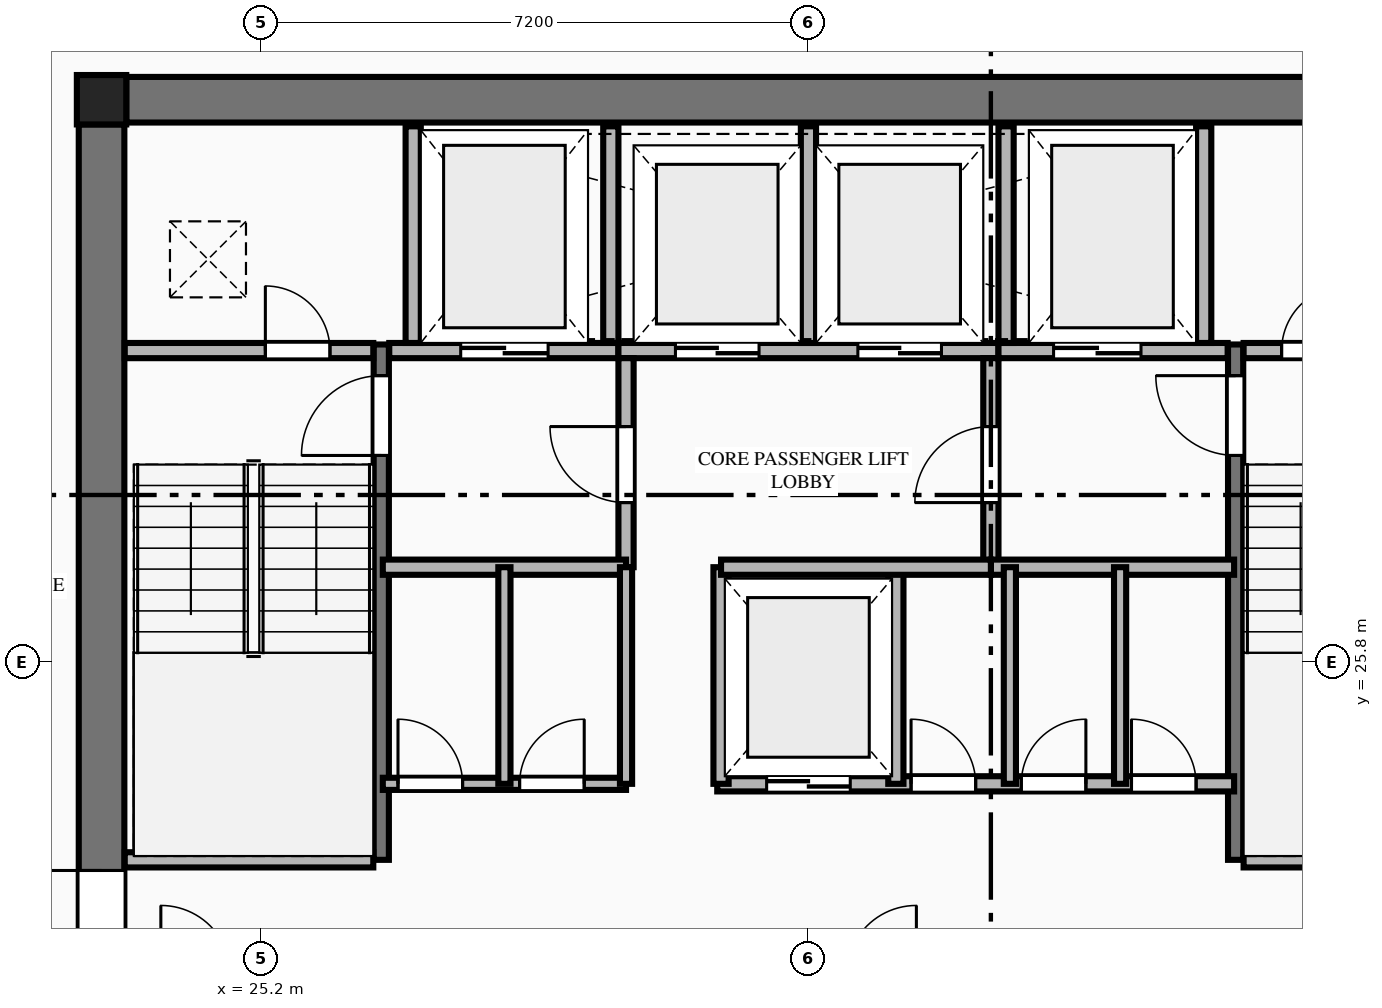
"""IFC4 building model, lengths in metres.
Left out: names, types, materials, properties, quantities, classifications, styles, units other than length and angle.
Written with IfcOpenShell. Run it as: python <this file> out.ifc"""

import sys

from ifc_helpers import new_model, si_unit, direction, frame, frame_2d, origin, origin_2d, place, context, subcontext, project, spatial, rectangle, extrude, element, fill, save


model = new_model("IFC4")
c1 = context("Model", 3, precision=1e-05, world=origin(), true_north=direction((0.0, 1.0)))
c2 = subcontext(c1, "Body", "Model", "MODEL_VIEW")
j1 = project(units=[si_unit("LENGTHUNIT", "METRE"), si_unit("PLANEANGLEUNIT", "RADIAN")], contexts=[c1])
p1 = place(None, origin())
s1 = spatial("IfcSite", under=j1, at=p1, CompositionType="ELEMENT")
p2 = place(p1, origin())
s2 = spatial("IfcBuilding", under=s1, at=p2, CompositionType="ELEMENT")
p3 = place(p2, frame((0.0, 0.0, 203.85)))
s3 = spatial("IfcBuildingStorey", under=s2, at=p3, CompositionType="ELEMENT", Elevation=203.85)
p4 = place(p3, frame((23.1, 33.2, 0.0), z_axis=(0.0, 0.0, 1.0), x_axis=(1.0, 0.0, 0.0)))
e1 = element("IfcColumn", 1, at=p4, inside=s3, PredefinedType="COLUMN", context=c2, shape_type="SweptSolid", body=[
    extrude(rectangle(XDim=0.65, YDim=0.65, at=origin_2d()), origin(), (0.0, 0.0, 1.0), 3.55),
])
p5 = place(p3, frame((23.425, 33.2, 0.0), z_axis=(0.0, 0.0, 1.0), x_axis=(1.0, 0.0, 0.0)))
e2 = element("IfcWall", 2, at=p5, inside=s3, PredefinedType="SHEAR", context=c2, shape_type="SweptSolid", body=[
    extrude(rectangle(XDim=17.95, YDim=0.6, at=frame_2d((8.975, 0.0))), origin(), (0.0, 0.0, 1.0), 3.35),
])
p6 = place(p3, frame((23.1, 18.925, 0.0), z_axis=(0.0, 0.0, 1.0), x_axis=(0.0, 1.0, 0.0)))
e3 = element("IfcWall", 3, at=p6, inside=s3, PredefinedType="SHEAR", context=c2, shape_type="SweptSolid", body=[
    extrude(rectangle(XDim=13.95, YDim=0.6, at=frame_2d((6.975, 0.0))), origin(), (0.0, 0.0, 1.0), 3.35),
])
p7 = place(p6, frame((2.915, 0.0, 0.0)))
e4 = element("IfcOpeningElement", 4, at=p7, cuts=e3, PredefinedType="OPENING", context=c2, shape_type="SweptSolid", body=[
    extrude(rectangle(XDim=1.22, YDim=2.25, at=frame_2d((0.61, 1.125))), frame((0.0, 0.31, 0.0), z_axis=(0.0, -1.0, 0.0), x_axis=(1.0, 0.0, 0.0)), (0.0, 0.0, 1.0), 0.62),
])
p8 = place(p3, frame((26.78, 23.2, 0.0), z_axis=(0.0, 0.0, 1.0), x_axis=(0.0, 1.0, 0.0)))
e5 = element("IfcWall", 5, at=p8, inside=s3, PredefinedType="SHEAR", context=c2, shape_type="SweptSolid", body=[
    extrude(rectangle(XDim=6.78, YDim=0.2, at=frame_2d((3.39, 0.0))), origin(), (0.0, 0.0, 1.0), 3.55),
])
p9 = place(p8, frame((5.32, 0.0, 0.0)))
e6 = element("IfcOpeningElement", 6, at=p9, cuts=e5, PredefinedType="OPENING", context=c2, shape_type="SweptSolid", body=[
    extrude(rectangle(XDim=1.05, YDim=2.15, at=frame_2d((0.525, 1.075))), frame((0.0, 0.11, 0.0), z_axis=(0.0, -1.0, 0.0), x_axis=(1.0, 0.0, 0.0)), (0.0, 0.0, 1.0), 0.22),
])
p10 = place(p3, frame((23.405, 23.2, 0.0), z_axis=(0.0, 0.0, 1.0), x_axis=(1.0, 0.0, 0.0)))
e7 = element("IfcWall", 7, at=p10, inside=s3, PredefinedType="PLUMBINGWALL", context=c2, shape_type="SweptSolid", body=[
    extrude(rectangle(XDim=3.27, YDim=0.2, at=frame_2d((1.635, 0.0))), origin(), (0.0, 0.0, 1.0), 3.35),
])
p11 = place(p3, frame((38.02, 23.2, 0.0), z_axis=(0.0, 0.0, 1.0), x_axis=(0.0, 1.0, 0.0)))
e8 = element("IfcWall", 8, at=p11, inside=s3, PredefinedType="SHEAR", context=c2, shape_type="SweptSolid", body=[
    extrude(rectangle(XDim=6.78, YDim=0.2, at=frame_2d((3.39, 0.0))), origin(), (0.0, 0.0, 1.0), 3.55),
])
p12 = place(p11, frame((5.32, 0.0, 0.0)))
e9 = element("IfcOpeningElement", 9, at=p12, cuts=e8, PredefinedType="OPENING", context=c2, shape_type="SweptSolid", body=[
    extrude(rectangle(XDim=1.05, YDim=2.15, at=frame_2d((0.525, 1.075))), frame((0.0, 0.11, 0.0), z_axis=(0.0, -1.0, 0.0), x_axis=(1.0, 0.0, 0.0)), (0.0, 0.0, 1.0), 0.22),
])
p13 = place(p3, frame((38.125, 23.2, 0.0), z_axis=(0.0, 0.0, 1.0), x_axis=(1.0, 0.0, 0.0)))
e10 = element("IfcWall", 10, at=p13, inside=s3, PredefinedType="PLUMBINGWALL", context=c2, shape_type="SweptSolid", body=[
    extrude(rectangle(XDim=3.27, YDim=0.2, at=frame_2d((1.635, 0.0))), origin(), (0.0, 0.0, 1.0), 3.35),
])
p14 = place(p3, frame((23.405, 29.9, 0.0), z_axis=(0.0, 0.0, 1.0), x_axis=(1.0, 0.0, 0.0)))
e11 = element("IfcWall", 11, at=p14, inside=s3, PredefinedType="PLUMBINGWALL", context=c2, shape_type="SweptSolid", body=[
    extrude(rectangle(XDim=3.27, YDim=0.2, at=frame_2d((1.635, 0.0))), origin(), (0.0, 0.0, 1.0), 3.35),
])
p15 = place(p14, frame((1.85, 0.0, 0.0)))
e12 = element("IfcOpeningElement", 12, at=p15, cuts=e11, PredefinedType="OPENING", context=c2, shape_type="SweptSolid", body=[
    extrude(rectangle(XDim=0.85, YDim=2.05, at=frame_2d((0.425, 1.025))), frame((0.0, 0.11, 0.0), z_axis=(0.0, -1.0, 0.0), x_axis=(1.0, 0.0, 0.0)), (0.0, 0.0, 1.0), 0.22),
])
p16 = place(p3, frame((26.885, 29.9, 0.0), z_axis=(0.0, 0.0, 1.0), x_axis=(1.0, 0.0, 0.0)))
e13 = element("IfcWall", 13, at=p16, inside=s3, PredefinedType="PLUMBINGWALL", context=c2, shape_type="SweptSolid", body=[
    extrude(rectangle(XDim=3.015, YDim=0.2, at=frame_2d((1.507, 0.0))), origin(), (0.0, 0.0, 1.0), 3.35),
])
p17 = place(p16, frame((0.94, 0.0, 0.0)))
e14 = element("IfcOpeningElement", 14, at=p17, cuts=e13, PredefinedType="OPENING", context=c2, shape_type="SweptSolid", body=[
    extrude(rectangle(XDim=1.15, YDim=2.2, at=frame_2d((0.575, 1.1))), frame((0.0, 0.11, 0.0), z_axis=(0.0, -1.0, 0.0), x_axis=(1.0, 0.0, 0.0)), (0.0, 0.0, 1.0), 0.22),
])
p18 = place(p3, frame((29.9, 29.9, 0.0), z_axis=(0.0, 0.0, 1.0), x_axis=(1.0, 0.0, 0.0)))
e15 = element("IfcWall", 15, at=p18, inside=s3, PredefinedType="PLUMBINGWALL", context=c2, shape_type="SweptSolid", body=[
    extrude(rectangle(XDim=5.0, YDim=0.2, at=frame_2d((2.5, 0.0))), origin(), (0.0, 0.0, 1.0), 3.35),
])
p19 = place(p18, frame((0.75, 0.0, 0.0)))
e16 = element("IfcOpeningElement", 16, at=p19, cuts=e15, PredefinedType="OPENING", context=c2, shape_type="SweptSolid", body=[
    extrude(rectangle(XDim=1.1, YDim=2.2, at=frame_2d((0.55, 1.1))), frame((0.0, 0.11, 0.0), z_axis=(0.0, -1.0, 0.0), x_axis=(1.0, 0.0, 0.0)), (0.0, 0.0, 1.0), 0.22),
])
p20 = place(p18, frame((3.15, 0.0, 0.0)))
e17 = element("IfcOpeningElement", 17, at=p20, cuts=e15, PredefinedType="OPENING", context=c2, shape_type="SweptSolid", body=[
    extrude(rectangle(XDim=1.1, YDim=2.2, at=frame_2d((0.55, 1.1))), frame((0.0, 0.11, 0.0), z_axis=(0.0, -1.0, 0.0), x_axis=(1.0, 0.0, 0.0)), (0.0, 0.0, 1.0), 0.22),
])
p21 = place(p3, frame((34.9, 29.9, 0.0), z_axis=(0.0, 0.0, 1.0), x_axis=(1.0, 0.0, 0.0)))
e18 = element("IfcWall", 18, at=p21, inside=s3, PredefinedType="PLUMBINGWALL", context=c2, shape_type="SweptSolid", body=[
    extrude(rectangle(XDim=3.015, YDim=0.2, at=frame_2d((1.508, 0.0))), origin(), (0.0, 0.0, 1.0), 3.35),
])
p22 = place(p21, frame((0.725, 0.0, 0.0)))
e19 = element("IfcOpeningElement", 19, at=p22, cuts=e18, PredefinedType="OPENING", context=c2, shape_type="SweptSolid", body=[
    extrude(rectangle(XDim=1.15, YDim=2.2, at=frame_2d((0.575, 1.1))), frame((0.0, 0.11, 0.0), z_axis=(0.0, -1.0, 0.0), x_axis=(1.0, 0.0, 0.0)), (0.0, 0.0, 1.0), 0.22),
])
p23 = place(p3, frame((38.125, 29.9, 0.0), z_axis=(0.0, 0.0, 1.0), x_axis=(1.0, 0.0, 0.0)))
e20 = element("IfcWall", 20, at=p23, inside=s3, PredefinedType="PLUMBINGWALL", context=c2, shape_type="SweptSolid", body=[
    extrude(rectangle(XDim=3.27, YDim=0.2, at=frame_2d((1.635, 0.0))), origin(), (0.0, 0.0, 1.0), 3.35),
])
p24 = place(p23, frame((0.5, 0.0, 0.0)))
e21 = element("IfcOpeningElement", 21, at=p24, cuts=e20, PredefinedType="OPENING", context=c2, shape_type="SweptSolid", body=[
    extrude(rectangle(XDim=0.85, YDim=2.05, at=frame_2d((0.425, 1.025))), frame((0.0, 0.11, 0.0), z_axis=(0.0, -1.0, 0.0), x_axis=(1.0, 0.0, 0.0)), (0.0, 0.0, 1.0), 0.22),
])
for number, where, z_axis, x_axis in (
    (22, (27.2, 30.0, 0.0), (0.0, 0.0, 1.0), (0.0, 1.0, 0.0)),
    (23, (29.8, 30.0, 0.0), (0.0, 0.0, 1.0), (0.0, 1.0, 0.0)),
    (24, (32.4, 30.0, 0.0), (0.0, 0.0, 1.0), (0.0, 1.0, 0.0)),
    (25, (35.0, 30.0, 0.0), (0.0, 0.0, 1.0), (0.0, 1.0, 0.0)),
    (26, (37.6, 30.0, 0.0), (0.0, 0.0, 1.0), (0.0, 1.0, 0.0)),
):
    element("IfcWall", number, at=place(p3, frame(where, z_axis=z_axis, x_axis=x_axis)), inside=s3, PredefinedType="PLUMBINGWALL", context=c2, shape_type="SweptSolid", body=[
        extrude(rectangle(XDim=2.85, YDim=0.2, at=frame_2d((1.425, 0.0))), origin(), (0.0, 0.0, 1.0), 3.35),
    ])
p25 = place(p3, frame((30.0, 27.05, 0.0), z_axis=(0.0, 0.0, 1.0), x_axis=(0.0, 1.0, 0.0)))
e27 = element("IfcWall", 27, at=p25, inside=s3, PredefinedType="PLUMBINGWALL", context=c2, shape_type="SweptSolid", body=[
    extrude(rectangle(XDim=2.75, YDim=0.2, at=frame_2d((1.375, 0.0))), origin(), (0.0, 0.0, 1.0), 3.35),
])
p26 = place(p25, frame((0.85, 0.0, 0.0)))
e28 = element("IfcOpeningElement", 28, at=p26, cuts=e27, PredefinedType="OPENING", context=c2, shape_type="SweptSolid", body=[
    extrude(rectangle(XDim=1.0, YDim=2.15, at=frame_2d((0.5, 1.075))), frame((0.0, 0.11, 0.0), z_axis=(0.0, -1.0, 0.0), x_axis=(1.0, 0.0, 0.0)), (0.0, 0.0, 1.0), 0.22),
])
p27 = place(p3, frame((26.8, 27.05, 0.0), z_axis=(0.0, 0.0, 1.0), x_axis=(1.0, 0.0, 0.0)))
e29 = element("IfcWall", 29, at=p27, inside=s3, PredefinedType="PLUMBINGWALL", context=c2, shape_type="SweptSolid", body=[
    extrude(rectangle(XDim=3.2, YDim=0.2, at=frame_2d((1.6, 0.0))), origin(), (0.0, 0.0, 1.0), 3.35),
])
p28 = place(p3, frame((34.8, 27.05, 0.0), z_axis=(0.0, 0.0, 1.0), x_axis=(0.0, 1.0, 0.0)))
e30 = element("IfcWall", 30, at=p28, inside=s3, PredefinedType="PLUMBINGWALL", context=c2, shape_type="SweptSolid", body=[
    extrude(rectangle(XDim=2.75, YDim=0.2, at=frame_2d((1.375, 0.0))), origin(), (0.0, 0.0, 1.0), 3.35),
])
p29 = place(p28, frame((0.85, 0.0, 0.0)))
e31 = element("IfcOpeningElement", 31, at=p29, cuts=e30, PredefinedType="OPENING", context=c2, shape_type="SweptSolid", body=[
    extrude(rectangle(XDim=1.0, YDim=2.15, at=frame_2d((0.5, 1.075))), frame((0.0, 0.11, 0.0), z_axis=(0.0, -1.0, 0.0), x_axis=(1.0, 0.0, 0.0)), (0.0, 0.0, 1.0), 0.22),
])
p30 = place(p3, frame((34.8, 27.05, 0.0), z_axis=(0.0, 0.0, 1.0), x_axis=(1.0, 0.0, 0.0)))
e32 = element("IfcWall", 32, at=p30, inside=s3, PredefinedType="PLUMBINGWALL", context=c2, shape_type="SweptSolid", body=[
    extrude(rectangle(XDim=3.2, YDim=0.2, at=frame_2d((1.6, 0.0))), origin(), (0.0, 0.0, 1.0), 3.35),
])
p31 = place(p3, frame((26.8, 24.2, 0.0), z_axis=(0.0, 0.0, 1.0), x_axis=(1.0, 0.0, 0.0)))
e33 = element("IfcWall", 33, at=p31, inside=s3, PredefinedType="PARTITIONING", context=c2, shape_type="SweptSolid", body=[
    extrude(rectangle(XDim=3.2, YDim=0.16, at=frame_2d((1.6, 0.0))), origin(), (0.0, 0.0, 1.0), 3.35),
])
p32 = place(p31, frame((0.2, 0.0, 0.0)))
e34 = element("IfcOpeningElement", 34, at=p32, cuts=e33, PredefinedType="OPENING", context=c2, shape_type="SweptSolid", body=[
    extrude(rectangle(XDim=0.85, YDim=2.05, at=frame_2d((0.425, 1.025))), frame((0.0, 0.09, 0.0), z_axis=(0.0, -1.0, 0.0), x_axis=(1.0, 0.0, 0.0)), (0.0, 0.0, 1.0), 0.18),
])
p33 = place(p31, frame((1.8, 0.0, 0.0)))
e35 = element("IfcOpeningElement", 35, at=p33, cuts=e33, PredefinedType="OPENING", context=c2, shape_type="SweptSolid", body=[
    extrude(rectangle(XDim=0.85, YDim=2.05, at=frame_2d((0.425, 1.025))), frame((0.0, 0.09, 0.0), z_axis=(0.0, -1.0, 0.0), x_axis=(1.0, 0.0, 0.0)), (0.0, 0.0, 1.0), 0.18),
])
p34 = place(p3, frame((30.0, 24.2, 0.0), z_axis=(0.0, 0.0, 1.0), x_axis=(0.0, 1.0, 0.0)))
e36 = element("IfcWall", 36, at=p34, inside=s3, PredefinedType="PARTITIONING", context=c2, shape_type="SweptSolid", body=[
    extrude(rectangle(XDim=2.85, YDim=0.16, at=frame_2d((1.425, 0.0))), origin(), (0.0, 0.0, 1.0), 3.35),
])
p35 = place(p3, frame((31.2, 24.2, 0.0), z_axis=(0.0, 0.0, 1.0), x_axis=(1.0, 0.0, 0.0)))
e37 = element("IfcWall", 37, at=p35, inside=s3, PredefinedType="PLUMBINGWALL", context=c2, shape_type="SweptSolid", body=[
    extrude(rectangle(XDim=6.8, YDim=0.2, at=frame_2d((3.4, 0.0))), origin(), (0.0, 0.0, 1.0), 3.35),
])
p36 = place(p35, frame((0.65, 0.0, 0.0)))
e38 = element("IfcOpeningElement", 38, at=p36, cuts=e37, PredefinedType="OPENING", context=c2, shape_type="SweptSolid", body=[
    extrude(rectangle(XDim=1.1, YDim=2.2, at=frame_2d((0.55, 1.1))), frame((0.0, 0.11, 0.0), z_axis=(0.0, -1.0, 0.0), x_axis=(1.0, 0.0, 0.0)), (0.0, 0.0, 1.0), 0.22),
])
p37 = place(p35, frame((2.55, 0.0, 0.0)))
e39 = element("IfcOpeningElement", 39, at=p37, cuts=e37, PredefinedType="OPENING", context=c2, shape_type="SweptSolid", body=[
    extrude(rectangle(XDim=0.85, YDim=2.05, at=frame_2d((0.425, 1.025))), frame((0.0, 0.11, 0.0), z_axis=(0.0, -1.0, 0.0), x_axis=(1.0, 0.0, 0.0)), (0.0, 0.0, 1.0), 0.22),
])
p38 = place(p35, frame((4.0, 0.0, 0.0)))
e40 = element("IfcOpeningElement", 40, at=p38, cuts=e37, PredefinedType="OPENING", context=c2, shape_type="SweptSolid", body=[
    extrude(rectangle(XDim=0.85, YDim=2.05, at=frame_2d((0.425, 1.025))), frame((0.0, 0.11, 0.0), z_axis=(0.0, -1.0, 0.0), x_axis=(1.0, 0.0, 0.0)), (0.0, 0.0, 1.0), 0.22),
])
p39 = place(p35, frame((5.45, 0.0, 0.0)))
e41 = element("IfcOpeningElement", 41, at=p39, cuts=e37, PredefinedType="OPENING", context=c2, shape_type="SweptSolid", body=[
    extrude(rectangle(XDim=0.85, YDim=2.05, at=frame_2d((0.425, 1.025))), frame((0.0, 0.11, 0.0), z_axis=(0.0, -1.0, 0.0), x_axis=(1.0, 0.0, 0.0)), (0.0, 0.0, 1.0), 0.22),
])
for number, where, z_axis, x_axis in (
    (42, (31.25, 24.2, 0.0), (0.0, 0.0, 1.0), (0.0, 1.0, 0.0)),
    (43, (33.55, 24.2, 0.0), (0.0, 0.0, 1.0), (0.0, 1.0, 0.0)),
):
    element("IfcWall", number, at=place(p3, frame(where, z_axis=z_axis, x_axis=x_axis)), inside=s3, PredefinedType="PLUMBINGWALL", context=c2, shape_type="SweptSolid", body=[
        extrude(rectangle(XDim=2.85, YDim=0.2, at=frame_2d((1.425, 0.0))), origin(), (0.0, 0.0, 1.0), 3.35),
    ])
p40 = place(p3, frame((31.25, 27.05, 0.0), z_axis=(0.0, 0.0, 1.0), x_axis=(1.0, 0.0, 0.0)))
e44 = element("IfcWall", 44, at=p40, inside=s3, PredefinedType="PLUMBINGWALL", context=c2, shape_type="SweptSolid", body=[
    extrude(rectangle(XDim=3.55, YDim=0.2, at=frame_2d((1.775, 0.0))), origin(), (0.0, 0.0, 1.0), 3.35),
])
for number, where, z_axis, x_axis in (
    (45, (28.4, 24.2, 0.0), (0.0, 0.0, 1.0), (0.0, 1.0, 0.0)),
    (46, (35.05, 24.2, 0.0), (0.0, 0.0, 1.0), (0.0, 1.0, 0.0)),
    (47, (36.5, 24.2, 0.0), (0.0, 0.0, 1.0), (0.0, 1.0, 0.0)),
):
    element("IfcWall", number, at=place(p3, frame(where, z_axis=z_axis, x_axis=x_axis)), inside=s3, PredefinedType="PARTITIONING", context=c2, shape_type="SweptSolid", body=[
        extrude(rectangle(XDim=2.85, YDim=0.16, at=frame_2d((1.425, 0.0))), origin(), (0.0, 0.0, 1.0), 3.35),
    ])
p41 = place(p7, origin())
e48 = element("IfcDoor", 48, at=p41, inside=s3, OperationType="SINGLE_SWING_RIGHT", PredefinedType="DOOR", context=c2, shape_type="SweptSolid", body=[
    extrude(rectangle(XDim=1.22, YDim=2.25, at=frame_2d((0.61, 1.125))), frame((0.0, 0.025, 0.0), z_axis=(0.0, -1.0, 0.0), x_axis=(1.0, 0.0, 0.0)), (0.0, 0.0, 1.0), 0.05),
])
fill(e4, e48)
p42 = place(p9, origin())
e49 = element("IfcDoor", 49, at=p42, inside=s3, OperationType="SINGLE_SWING_LEFT", PredefinedType="DOOR", context=c2, shape_type="SweptSolid", body=[
    extrude(rectangle(XDim=1.05, YDim=2.15, at=frame_2d((0.525, 1.075))), frame((0.0, 0.025, 0.0), z_axis=(0.0, -1.0, 0.0), x_axis=(1.0, 0.0, 0.0)), (0.0, 0.0, 1.0), 0.05),
])
fill(e6, e49)
p43 = place(p12, origin())
e50 = element("IfcDoor", 50, at=p43, inside=s3, OperationType="SINGLE_SWING_RIGHT", PredefinedType="DOOR", context=c2, shape_type="SweptSolid", body=[
    extrude(rectangle(XDim=1.05, YDim=2.15, at=frame_2d((0.525, 1.075))), frame((0.0, 0.025, 0.0), z_axis=(0.0, -1.0, 0.0), x_axis=(1.0, 0.0, 0.0)), (0.0, 0.0, 1.0), 0.05),
])
fill(e9, e50)
p44 = place(p15, origin())
e51 = element("IfcDoor", 51, at=p44, inside=s3, OperationType="SINGLE_SWING_LEFT", PredefinedType="DOOR", context=c2, shape_type="SweptSolid", body=[
    extrude(rectangle(XDim=0.85, YDim=2.05, at=frame_2d((0.425, 1.025))), frame((0.0, 0.025, 0.0), z_axis=(0.0, -1.0, 0.0), x_axis=(1.0, 0.0, 0.0)), (0.0, 0.0, 1.0), 0.05),
])
fill(e12, e51)
p45 = place(p24, origin())
e52 = element("IfcDoor", 52, at=p45, inside=s3, OperationType="SINGLE_SWING_RIGHT", PredefinedType="DOOR", context=c2, shape_type="SweptSolid", body=[
    extrude(rectangle(XDim=0.85, YDim=2.05, at=frame_2d((0.425, 1.025))), frame((0.0, 0.025, 0.0), z_axis=(0.0, -1.0, 0.0), x_axis=(1.0, 0.0, 0.0)), (0.0, 0.0, 1.0), 0.05),
])
fill(e21, e52)
p46 = place(p17, origin())
e53 = element("IfcDoor", 53, at=p46, inside=s3, OperationType="DOUBLE_DOOR_SLIDING", PredefinedType="DOOR", context=c2, shape_type="SweptSolid", body=[
    extrude(rectangle(XDim=1.15, YDim=2.2, at=frame_2d((0.575, 1.1))), frame((0.0, 0.025, 0.0), z_axis=(0.0, -1.0, 0.0), x_axis=(1.0, 0.0, 0.0)), (0.0, 0.0, 1.0), 0.05),
])
fill(e14, e53)
p47 = place(p22, origin())
e54 = element("IfcDoor", 54, at=p47, inside=s3, OperationType="DOUBLE_DOOR_SLIDING", PredefinedType="DOOR", context=c2, shape_type="SweptSolid", body=[
    extrude(rectangle(XDim=1.15, YDim=2.2, at=frame_2d((0.575, 1.1))), frame((0.0, 0.025, 0.0), z_axis=(0.0, -1.0, 0.0), x_axis=(1.0, 0.0, 0.0)), (0.0, 0.0, 1.0), 0.05),
])
fill(e19, e54)
p48 = place(p19, origin())
e55 = element("IfcDoor", 55, at=p48, inside=s3, OperationType="DOUBLE_DOOR_SLIDING", PredefinedType="DOOR", context=c2, shape_type="SweptSolid", body=[
    extrude(rectangle(XDim=1.1, YDim=2.2, at=frame_2d((0.55, 1.1))), frame((0.0, 0.025, 0.0), z_axis=(0.0, -1.0, 0.0), x_axis=(1.0, 0.0, 0.0)), (0.0, 0.0, 1.0), 0.05),
])
fill(e16, e55)
p49 = place(p20, origin())
e56 = element("IfcDoor", 56, at=p49, inside=s3, OperationType="DOUBLE_DOOR_SLIDING", PredefinedType="DOOR", context=c2, shape_type="SweptSolid", body=[
    extrude(rectangle(XDim=1.1, YDim=2.2, at=frame_2d((0.55, 1.1))), frame((0.0, 0.025, 0.0), z_axis=(0.0, -1.0, 0.0), x_axis=(1.0, 0.0, 0.0)), (0.0, 0.0, 1.0), 0.05),
])
fill(e17, e56)
p50 = place(p26, origin())
e57 = element("IfcDoor", 57, at=p50, inside=s3, OperationType="SINGLE_SWING_RIGHT", PredefinedType="DOOR", context=c2, shape_type="SweptSolid", body=[
    extrude(rectangle(XDim=1.0, YDim=2.15, at=frame_2d((0.5, 1.075))), frame((0.0, 0.025, 0.0), z_axis=(0.0, -1.0, 0.0), x_axis=(1.0, 0.0, 0.0)), (0.0, 0.0, 1.0), 0.05),
])
fill(e28, e57)
p51 = place(p29, origin())
e58 = element("IfcDoor", 58, at=p51, inside=s3, OperationType="SINGLE_SWING_LEFT", PredefinedType="DOOR", context=c2, shape_type="SweptSolid", body=[
    extrude(rectangle(XDim=1.0, YDim=2.15, at=frame_2d((0.5, 1.075))), frame((0.0, 0.025, 0.0), z_axis=(0.0, -1.0, 0.0), x_axis=(1.0, 0.0, 0.0)), (0.0, 0.0, 1.0), 0.05),
])
fill(e31, e58)
p52 = place(p36, origin())
e59 = element("IfcDoor", 59, at=p52, inside=s3, OperationType="DOUBLE_DOOR_SLIDING", PredefinedType="DOOR", context=c2, shape_type="SweptSolid", body=[
    extrude(rectangle(XDim=1.1, YDim=2.2, at=frame_2d((0.55, 1.1))), frame((0.0, 0.025, 0.0), z_axis=(0.0, -1.0, 0.0), x_axis=(1.0, 0.0, 0.0)), (0.0, 0.0, 1.0), 0.05),
])
fill(e38, e59)
p53 = place(p32, origin())
e60 = element("IfcDoor", 60, at=p53, inside=s3, OperationType="SINGLE_SWING_LEFT", PredefinedType="DOOR", context=c2, shape_type="SweptSolid", body=[
    extrude(rectangle(XDim=0.85, YDim=2.05, at=frame_2d((0.425, 1.025))), frame((0.0, 0.025, 0.0), z_axis=(0.0, -1.0, 0.0), x_axis=(1.0, 0.0, 0.0)), (0.0, 0.0, 1.0), 0.05),
])
fill(e34, e60)
p54 = place(p33, origin())
e61 = element("IfcDoor", 61, at=p54, inside=s3, OperationType="SINGLE_SWING_RIGHT", PredefinedType="DOOR", context=c2, shape_type="SweptSolid", body=[
    extrude(rectangle(XDim=0.85, YDim=2.05, at=frame_2d((0.425, 1.025))), frame((0.0, 0.025, 0.0), z_axis=(0.0, -1.0, 0.0), x_axis=(1.0, 0.0, 0.0)), (0.0, 0.0, 1.0), 0.05),
])
fill(e35, e61)
p55 = place(p37, origin())
e62 = element("IfcDoor", 62, at=p55, inside=s3, OperationType="SINGLE_SWING_LEFT", PredefinedType="DOOR", context=c2, shape_type="SweptSolid", body=[
    extrude(rectangle(XDim=0.85, YDim=2.05, at=frame_2d((0.425, 1.025))), frame((0.0, 0.025, 0.0), z_axis=(0.0, -1.0, 0.0), x_axis=(1.0, 0.0, 0.0)), (0.0, 0.0, 1.0), 0.05),
])
fill(e39, e62)
p56 = place(p38, origin())
e63 = element("IfcDoor", 63, at=p56, inside=s3, OperationType="SINGLE_SWING_RIGHT", PredefinedType="DOOR", context=c2, shape_type="SweptSolid", body=[
    extrude(rectangle(XDim=0.85, YDim=2.05, at=frame_2d((0.425, 1.025))), frame((0.0, 0.025, 0.0), z_axis=(0.0, -1.0, 0.0), x_axis=(1.0, 0.0, 0.0)), (0.0, 0.0, 1.0), 0.05),
])
fill(e40, e63)
p57 = place(p39, origin())
e64 = element("IfcDoor", 64, at=p57, inside=s3, OperationType="SINGLE_SWING_LEFT", PredefinedType="DOOR", context=c2, shape_type="SweptSolid", body=[
    extrude(rectangle(XDim=0.85, YDim=2.05, at=frame_2d((0.425, 1.025))), frame((0.0, 0.025, 0.0), z_axis=(0.0, -1.0, 0.0), x_axis=(1.0, 0.0, 0.0)), (0.0, 0.0, 1.0), 0.05),
])
fill(e41, e64)
save(model, sys.argv[1])
